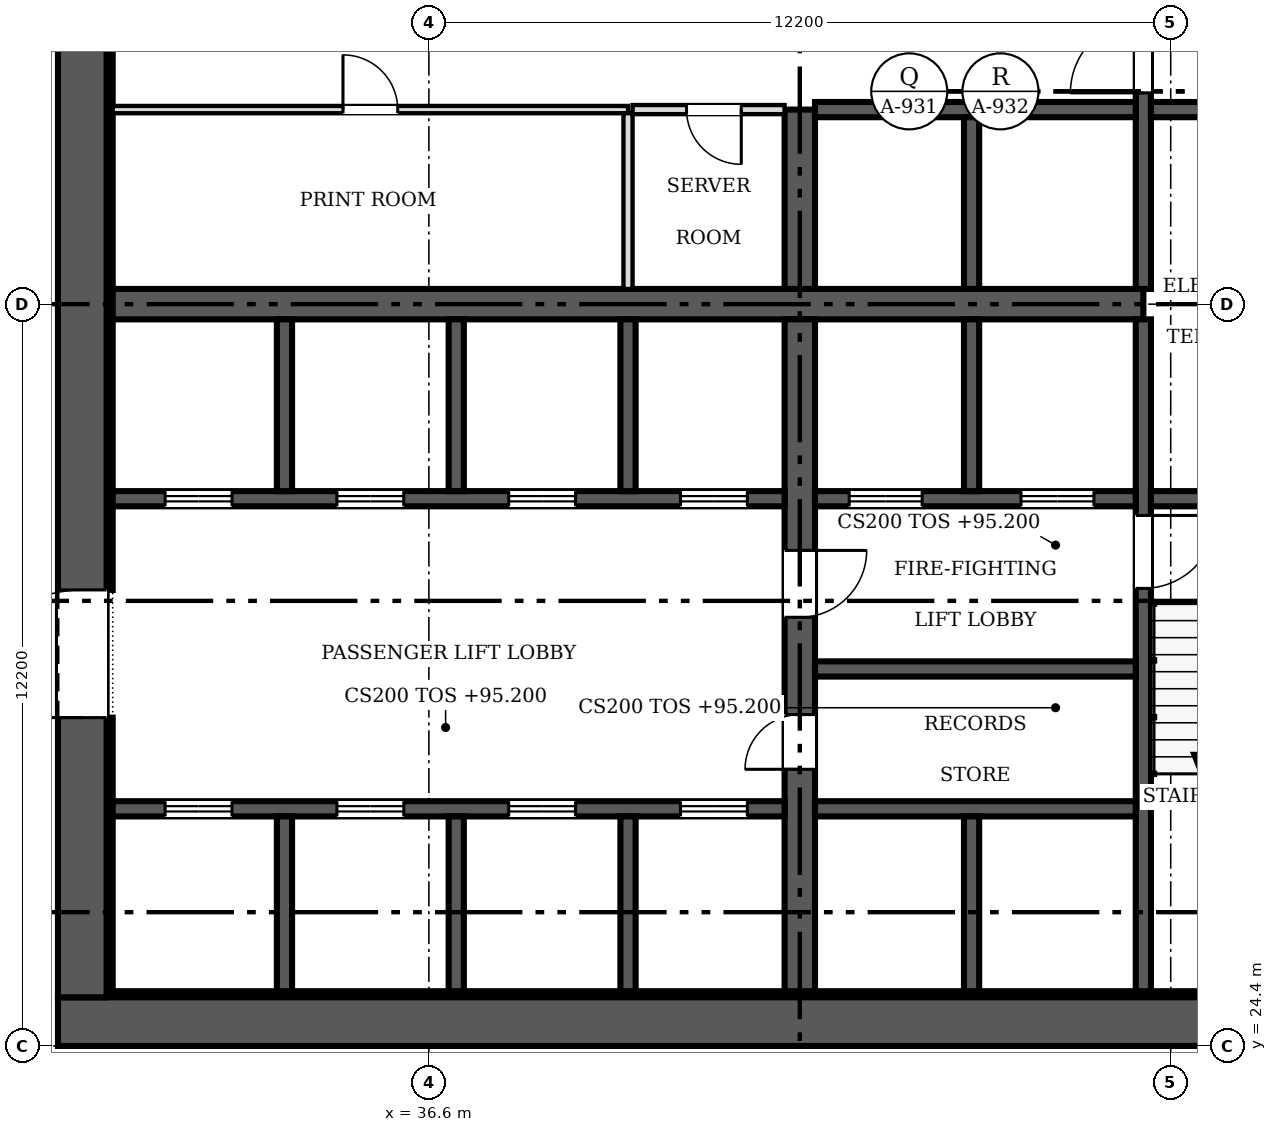
"""IFC4 building model, lengths in metres.
Left out: names, types, materials, properties, quantities, classifications, styles, units other than length and angle.
Written with IfcOpenShell. Run it as: python <this file> out.ifc"""

import sys

from ifc_helpers import new_model, si_unit, direction, frame, frame_2d, origin, place, context, subcontext, project, spatial, rectangle, extrude, source, transform, mapped, element, fill, save


model = new_model("IFC4")
c1 = context("Model", 3, precision=1e-05, world=origin(), true_north=direction((0.0, 1.0)))
c2 = subcontext(c1, "Body", "Model", "MODEL_VIEW")
j1 = project(units=[si_unit("LENGTHUNIT", "METRE"), si_unit("PLANEANGLEUNIT", "RADIAN")], contexts=[c1])
p1 = place(None, origin())
s1 = spatial("IfcSite", under=j1, at=p1, CompositionType="ELEMENT")
p2 = place(p1, origin())
s2 = spatial("IfcBuilding", under=s1, at=p2, CompositionType="ELEMENT")
p3 = place(p2, frame((0.0, 0.0, 95.2)))
s3 = spatial("IfcBuildingStorey", under=s2, at=p3, CompositionType="ELEMENT", Elevation=95.2)
p4 = place(p3, frame((54.9, 24.8, 0.0), z_axis=(0.0, 0.0, 1.0), x_axis=(-1.0, 0.0, 0.0)))
e1 = element("IfcWall", 1, at=p4, inside=s3, PredefinedType="SHEAR", context=c2, shape_type="SweptSolid", body=[
    extrude(rectangle(XDim=24.4, YDim=0.8, at=frame_2d((12.2, 0.0))), origin(), (0.0, 0.0, 1.0), 3.8),
])
m1 = source(origin(), c2, "Body", "SweptSolid", [
    extrude(rectangle(XDim=1.2, YDim=2.1, at=frame_2d((0.6, 1.05))), frame((0.0, 0.41, 0.0), z_axis=(0.0, -1.0, 0.0), x_axis=(1.0, 0.0, 0.0)), (0.0, 0.0, 1.0), 0.82),
])
p5 = place(p4, frame((1.5, 0.0, 0.0)))
e2 = element("IfcOpeningElement", 2, at=p5, cuts=e1, PredefinedType="OPENING", context=c2, shape_type="MappedRepresentation", body=[
    mapped(m1, transform((0.0, 0.0, 0.0), scale=1.0)),
])
p6 = place(p3, frame((30.9, 25.2, 0.0), z_axis=(0.0, 0.0, 1.0), x_axis=(0.0, 1.0, 0.0)))
e3 = element("IfcWall", 3, at=p6, inside=s3, PredefinedType="SHEAR", context=c2, shape_type="SweptSolid", body=[
    extrude(rectangle(XDim=22.8, YDim=0.8, at=frame_2d((11.4, 0.0))), origin(), (0.0, 0.0, 1.0), 3.8),
])
m2 = source(origin(), c2, "Body", "SweptSolid", [
    extrude(rectangle(XDim=2.1, YDim=2.4, at=frame_2d((1.05, 1.2))), frame((0.0, 0.41, 0.0), z_axis=(0.0, -1.0, 0.0), x_axis=(1.0, 0.0, 0.0)), (0.0, 0.0, 1.0), 0.82),
])
p7 = place(p6, frame((4.6, 0.0, 0.0)))
e4 = element("IfcOpeningElement", 4, at=p7, cuts=e3, PredefinedType="OPENING", context=c2, shape_type="MappedRepresentation", body=[
    mapped(m2, transform((0.0, 0.0, 0.0), scale=1.0)),
])
p8 = place(p6, frame((16.1, 0.0, 0.0)))
e5 = element("IfcOpeningElement", 5, at=p8, cuts=e3, PredefinedType="OPENING", context=c2, shape_type="MappedRepresentation", body=[
    mapped(m2, transform((0.0, 0.0, 0.0), scale=1.0)),
])
p9 = place(p3, frame((31.3, 25.25, 0.0), z_axis=(0.0, 0.0, 1.0), x_axis=(1.0, 0.0, 0.0)))
e6 = element("IfcWall", 6, at=p9, inside=s3, PredefinedType="SOLIDWALL", context=c2, shape_type="SweptSolid", body=[
    extrude(rectangle(XDim=20.9, YDim=0.1, at=frame_2d((10.45, 0.0))), origin(), (0.0, 0.0, 1.0), 3.8),
])
p10 = place(p3, frame((31.35, 25.3, 0.0), z_axis=(0.0, 0.0, 1.0), x_axis=(0.0, 1.0, 0.0)))
e7 = element("IfcWall", 7, at=p10, inside=s3, PredefinedType="SOLIDWALL", context=c2, shape_type="SweptSolid", body=[
    extrude(rectangle(XDim=4.5, YDim=0.1, at=frame_2d((2.25, 0.0))), origin(), (0.0, 0.0, 1.0), 3.8),
])
p11 = place(p3, frame((31.35, 31.9, 0.0), z_axis=(0.0, 0.0, 1.0), x_axis=(0.0, 1.0, 0.0)))
e8 = element("IfcWall", 8, at=p11, inside=s3, PredefinedType="SOLIDWALL", context=c2, shape_type="SweptSolid", body=[
    extrude(rectangle(XDim=9.4, YDim=0.1, at=frame_2d((4.7, 0.0))), origin(), (0.0, 0.0, 1.0), 3.8),
])
p12 = place(p3, frame((31.4, 36.6, 0.0), z_axis=(0.0, 0.0, 1.0), x_axis=(1.0, 0.0, 0.0)))
e9 = element("IfcWall", 9, at=p12, inside=s3, PredefinedType="SHEAR", context=c2, shape_type="SweptSolid", body=[
    extrude(rectangle(XDim=16.95, YDim=0.5, at=frame_2d((8.475, 0.0))), origin(), (0.0, 0.0, 1.0), 3.8),
])
p13 = place(p3, frame((42.7, 36.35, 0.0), z_axis=(0.0, 0.0, 1.0), x_axis=(0.0, -1.0, 0.0)))
e10 = element("IfcWall", 10, at=p13, inside=s3, PredefinedType="SHEAR", context=c2, shape_type="SweptSolid", body=[
    extrude(rectangle(XDim=11.05, YDim=0.5, at=frame_2d((5.525, 0.0))), origin(), (0.0, 0.0, 1.0), 3.8),
])
m3 = source(origin(), c2, "Body", "SweptSolid", [
    extrude(rectangle(XDim=0.9, YDim=2.1, at=frame_2d((0.45, 1.05))), frame((0.0, 0.26, 0.0), z_axis=(0.0, -1.0, 0.0), x_axis=(1.0, 0.0, 0.0)), (0.0, 0.0, 1.0), 0.52),
])
p14 = place(p13, frame((6.5, 0.0, 0.0)))
e11 = element("IfcOpeningElement", 11, at=p14, cuts=e10, PredefinedType="OPENING", context=c2, shape_type="MappedRepresentation", body=[
    mapped(m3, transform((0.0, 0.0, 0.0), scale=1.0)),
])
m4 = source(origin(), c2, "Body", "SweptSolid", [
    extrude(rectangle(XDim=1.1, YDim=2.1, at=frame_2d((0.55, 1.05))), frame((0.0, 0.26, 0.0), z_axis=(0.0, -1.0, 0.0), x_axis=(1.0, 0.0, 0.0)), (0.0, 0.0, 1.0), 0.52),
])
p15 = place(p13, frame((3.8, 0.0, 0.0)))
e12 = element("IfcOpeningElement", 12, at=p15, cuts=e10, PredefinedType="OPENING", context=c2, shape_type="MappedRepresentation", body=[
    mapped(m4, transform((0.0, 0.0, 0.0), scale=1.0)),
])
p16 = place(p3, frame((42.7, 36.85, 0.0), z_axis=(0.0, 0.0, 1.0), x_axis=(0.0, 1.0, 0.0)))
e13 = element("IfcWall", 13, at=p16, inside=s3, PredefinedType="SHEAR", context=c2, shape_type="SweptSolid", body=[
    extrude(rectangle(XDim=2.95, YDim=0.5, at=frame_2d((1.475, 0.0))), origin(), (0.0, 0.0, 1.0), 3.8),
])
p17 = place(p3, frame((48.35, 36.35, 0.0), z_axis=(0.0, 0.0, 1.0), x_axis=(0.0, -1.0, 0.0)))
e14 = element("IfcWall", 14, at=p17, inside=s3, PredefinedType="SOLIDWALL", context=c2, shape_type="SweptSolid", body=[
    extrude(rectangle(XDim=11.05, YDim=0.25, at=frame_2d((5.525, 0.0))), origin(), (0.0, 0.0, 1.0), 3.8),
])
m5 = source(origin(), c2, "Body", "SweptSolid", [
    extrude(rectangle(XDim=1.2, YDim=2.1, at=frame_2d((0.6, 1.05))), frame((0.0, 0.135, 0.0), z_axis=(0.0, -1.0, 0.0), x_axis=(1.0, 0.0, 0.0)), (0.0, 0.0, 1.0), 0.27),
])
p18 = place(p17, frame((3.225, 0.0, 0.0)))
e15 = element("IfcOpeningElement", 15, at=p18, cuts=e14, PredefinedType="OPENING", context=c2, shape_type="MappedRepresentation", body=[
    mapped(m5, transform((0.0, 0.0, 0.0), scale=1.0)),
])
p19 = place(p3, frame((48.35, 47.9, 0.0), z_axis=(0.0, 0.0, 1.0), x_axis=(0.0, -1.0, 0.0)))
e16 = element("IfcWall", 16, at=p19, inside=s3, PredefinedType="SOLIDWALL", context=c2, shape_type="SweptSolid", body=[
    extrude(rectangle(XDim=11.05, YDim=0.25, at=frame_2d((5.525, 0.0))), origin(), (0.0, 0.0, 1.0), 3.8),
])
p20 = place(p19, frame((6.625, 0.0, 0.0)))
e17 = element("IfcOpeningElement", 17, at=p20, cuts=e16, PredefinedType="OPENING", context=c2, shape_type="MappedRepresentation", body=[
    mapped(m5, transform((0.0, 0.0, 0.0), scale=1.0)),
])
p21 = place(p3, frame((42.45, 33.4, 0.0), z_axis=(0.0, 0.0, 1.0), x_axis=(-1.0, 0.0, 0.0)))
e18 = element("IfcWall", 18, at=p21, inside=s3, PredefinedType="SOLIDWALL", context=c2, shape_type="SweptSolid", body=[
    extrude(rectangle(XDim=11.05, YDim=0.25, at=frame_2d((5.525, 0.0))), origin(), (0.0, 0.0, 1.0), 3.8),
])
m6 = source(origin(), c2, "Body", "SweptSolid", [
    extrude(rectangle(XDim=1.1, YDim=2.1, at=frame_2d((0.55, 1.05))), frame((0.0, 0.135, 0.0), z_axis=(0.0, -1.0, 0.0), x_axis=(1.0, 0.0, 0.0)), (0.0, 0.0, 1.0), 0.27),
])
p22 = place(p21, frame((9.087, 0.0, 0.0)))
e19 = element("IfcOpeningElement", 19, at=p22, cuts=e18, PredefinedType="OPENING", context=c2, shape_type="MappedRepresentation", body=[
    mapped(m6, transform((0.0, 0.0, 0.0), scale=1.0)),
])
p23 = place(p21, frame((6.262, 0.0, 0.0)))
e20 = element("IfcOpeningElement", 20, at=p23, cuts=e18, PredefinedType="OPENING", context=c2, shape_type="MappedRepresentation", body=[
    mapped(m6, transform((0.0, 0.0, 0.0), scale=1.0)),
])
p24 = place(p21, frame((3.438, 0.0, 0.0)))
e21 = element("IfcOpeningElement", 21, at=p24, cuts=e18, PredefinedType="OPENING", context=c2, shape_type="MappedRepresentation", body=[
    mapped(m6, transform((0.0, 0.0, 0.0), scale=1.0)),
])
p25 = place(p21, frame((0.613, 0.0, 0.0)))
e22 = element("IfcOpeningElement", 22, at=p25, cuts=e18, PredefinedType="OPENING", context=c2, shape_type="MappedRepresentation", body=[
    mapped(m6, transform((0.0, 0.0, 0.0), scale=1.0)),
])
p26 = place(p3, frame((48.225, 33.4, 0.0), z_axis=(0.0, 0.0, 1.0), x_axis=(-1.0, 0.0, 0.0)))
e23 = element("IfcWall", 23, at=p26, inside=s3, PredefinedType="SOLIDWALL", context=c2, shape_type="SweptSolid", body=[
    extrude(rectangle(XDim=5.275, YDim=0.25, at=frame_2d((2.638, 0.0))), origin(), (0.0, 0.0, 1.0), 3.8),
])
p27 = place(p26, frame((3.512, 0.0, 0.0)))
e24 = element("IfcOpeningElement", 24, at=p27, cuts=e23, PredefinedType="OPENING", context=c2, shape_type="MappedRepresentation", body=[
    mapped(m5, transform((0.0, 0.0, 0.0), scale=1.0)),
])
p28 = place(p26, frame((0.688, 0.0, 0.0)))
e25 = element("IfcOpeningElement", 25, at=p28, cuts=e23, PredefinedType="OPENING", context=c2, shape_type="MappedRepresentation", body=[
    mapped(m5, transform((0.0, 0.0, 0.0), scale=1.0)),
])
p29 = place(p3, frame((48.475, 33.4, 0.0), z_axis=(0.0, 0.0, 1.0), x_axis=(1.0, 0.0, 0.0)))
e26 = element("IfcWall", 26, at=p29, inside=s3, PredefinedType="SOLIDWALL", context=c2, shape_type="SweptSolid", body=[
    extrude(rectangle(XDim=3.525, YDim=0.25, at=frame_2d((1.762, 0.0))), origin(), (0.0, 0.0, 1.0), 3.8),
])
p30 = place(p3, frame((31.4, 28.3, 0.0), z_axis=(0.0, 0.0, 1.0), x_axis=(1.0, 0.0, 0.0)))
e27 = element("IfcWall", 27, at=p30, inside=s3, PredefinedType="SOLIDWALL", context=c2, shape_type="SweptSolid", body=[
    extrude(rectangle(XDim=11.05, YDim=0.25, at=frame_2d((5.525, 0.0))), origin(), (0.0, 0.0, 1.0), 3.8),
])
p31 = place(p30, frame((0.863, 0.0, 0.0)))
e28 = element("IfcOpeningElement", 28, at=p31, cuts=e27, PredefinedType="OPENING", context=c2, shape_type="MappedRepresentation", body=[
    mapped(m6, transform((0.0, 0.0, 0.0), scale=1.0)),
])
p32 = place(p30, frame((3.688, 0.0, 0.0)))
e29 = element("IfcOpeningElement", 29, at=p32, cuts=e27, PredefinedType="OPENING", context=c2, shape_type="MappedRepresentation", body=[
    mapped(m6, transform((0.0, 0.0, 0.0), scale=1.0)),
])
p33 = place(p30, frame((6.512, 0.0, 0.0)))
e30 = element("IfcOpeningElement", 30, at=p33, cuts=e27, PredefinedType="OPENING", context=c2, shape_type="MappedRepresentation", body=[
    mapped(m6, transform((0.0, 0.0, 0.0), scale=1.0)),
])
p34 = place(p30, frame((9.337, 0.0, 0.0)))
e31 = element("IfcOpeningElement", 31, at=p34, cuts=e27, PredefinedType="OPENING", context=c2, shape_type="MappedRepresentation", body=[
    mapped(m6, transform((0.0, 0.0, 0.0), scale=1.0)),
])
for number, where, z_axis, x_axis in (
    (32, (42.95, 28.3, 0.0), (0.0, 0.0, 1.0), (1.0, 0.0, 0.0)),
    (33, (42.95, 39.8, 0.0), (0.0, 0.0, 1.0), (1.0, 0.0, 0.0)),
):
    element("IfcWall", number, at=place(p3, frame(where, z_axis=z_axis, x_axis=x_axis)), inside=s3, PredefinedType="SOLIDWALL", context=c2, shape_type="SweptSolid", body=[
        extrude(rectangle(XDim=5.275, YDim=0.25, at=frame_2d((2.638, 0.0))), origin(), (0.0, 0.0, 1.0), 3.8),
    ])
p35 = place(p3, frame((48.475, 39.8, 0.0), z_axis=(0.0, 0.0, 1.0), x_axis=(1.0, 0.0, 0.0)))
e34 = element("IfcWall", 34, at=p35, inside=s3, PredefinedType="SOLIDWALL", context=c2, shape_type="SweptSolid", body=[
    extrude(rectangle(XDim=3.525, YDim=0.25, at=frame_2d((1.762, 0.0))), origin(), (0.0, 0.0, 1.0), 3.8),
])
p36 = place(p3, frame((45.525, 33.525, 0.0), z_axis=(0.0, 0.0, 1.0), x_axis=(0.0, 1.0, 0.0)))
e35 = element("IfcWall", 35, at=p36, inside=s3, PredefinedType="SOLIDWALL", context=c2, shape_type="SweptSolid", body=[
    extrude(rectangle(XDim=2.825, YDim=0.25, at=frame_2d((1.413, 0.0))), origin(), (0.0, 0.0, 1.0), 3.8),
])
p37 = place(p3, frame((45.525, 36.85, 0.0), z_axis=(0.0, 0.0, 1.0), x_axis=(0.0, 1.0, 0.0)))
e36 = element("IfcWall", 36, at=p37, inside=s3, PredefinedType="SOLIDWALL", context=c2, shape_type="SweptSolid", body=[
    extrude(rectangle(XDim=2.825, YDim=0.25, at=frame_2d((1.413, 0.0))), origin(), (0.0, 0.0, 1.0), 3.8),
])
p38 = place(p3, frame((42.95, 30.6, 0.0), z_axis=(0.0, 0.0, 1.0), x_axis=(1.0, 0.0, 0.0)))
e37 = element("IfcWall", 37, at=p38, inside=s3, PredefinedType="SOLIDWALL", context=c2, shape_type="SweptSolid", body=[
    extrude(rectangle(XDim=5.275, YDim=0.25, at=frame_2d((2.638, 0.0))), origin(), (0.0, 0.0, 1.0), 3.8),
])
for number, where, z_axis, x_axis in (
    (38, (34.225, 33.525, 0.0), (0.0, 0.0, 1.0), (0.0, 1.0, 0.0)),
    (39, (37.05, 33.525, 0.0), (0.0, 0.0, 1.0), (0.0, 1.0, 0.0)),
    (40, (39.875, 33.525, 0.0), (0.0, 0.0, 1.0), (0.0, 1.0, 0.0)),
):
    element("IfcWall", number, at=place(p3, frame(where, z_axis=z_axis, x_axis=x_axis)), inside=s3, PredefinedType="SOLIDWALL", context=c2, shape_type="SweptSolid", body=[
        extrude(rectangle(XDim=2.825, YDim=0.25, at=frame_2d((1.413, 0.0))), origin(), (0.0, 0.0, 1.0), 3.8),
    ])
for number, where, z_axis, x_axis in (
    (41, (34.225, 25.3, 0.0), (0.0, 0.0, 1.0), (0.0, 1.0, 0.0)),
    (42, (37.05, 25.3, 0.0), (0.0, 0.0, 1.0), (0.0, 1.0, 0.0)),
    (43, (39.875, 25.3, 0.0), (0.0, 0.0, 1.0), (0.0, 1.0, 0.0)),
    (44, (45.525, 25.3, 0.0), (0.0, 0.0, 1.0), (0.0, 1.0, 0.0)),
):
    element("IfcWall", number, at=place(p3, frame(where, z_axis=z_axis, x_axis=x_axis)), inside=s3, PredefinedType="SOLIDWALL", context=c2, shape_type="SweptSolid", body=[
        extrude(rectangle(XDim=2.875, YDim=0.25, at=frame_2d((1.438, 0.0))), origin(), (0.0, 0.0, 1.0), 3.8),
    ])
p39 = place(p3, frame((39.875, 39.8, 0.0), z_axis=(0.0, 0.0, 1.0), x_axis=(-1.0, 0.0, 0.0)))
e45 = element("IfcWall", 45, at=p39, inside=s3, PredefinedType="PARTITIONING", context=c2, shape_type="SweptSolid", body=[
    extrude(rectangle(XDim=8.475, YDim=0.12, at=frame_2d((4.238, 0.0))), origin(), (0.0, 0.0, 1.0), 3.6),
])
m7 = source(origin(), c2, "Body", "SweptSolid", [
    extrude(rectangle(XDim=0.9, YDim=2.1, at=frame_2d((0.45, 1.05))), frame((0.0, 0.07, 0.0), z_axis=(0.0, -1.0, 0.0), x_axis=(1.0, 0.0, 0.0)), (0.0, 0.0, 1.0), 0.14),
])
p40 = place(p39, frame((3.788, 0.0, 0.0)))
e46 = element("IfcOpeningElement", 46, at=p40, cuts=e45, PredefinedType="OPENING", context=c2, shape_type="MappedRepresentation", body=[
    mapped(m7, transform((0.0, 0.0, 0.0), scale=1.0)),
])
p41 = place(p3, frame((39.875, 36.85, 0.0), z_axis=(0.0, 0.0, 1.0), x_axis=(0.0, 1.0, 0.0)))
e47 = element("IfcWall", 47, at=p41, inside=s3, PredefinedType="PARTITIONING", context=c2, shape_type="SweptSolid", body=[
    extrude(rectangle(XDim=2.89, YDim=0.15, at=frame_2d((1.445, 0.0))), origin(), (0.0, 0.0, 1.0), 3.6),
])
p42 = place(p3, frame((42.45, 39.8, 0.0), z_axis=(0.0, 0.0, 1.0), x_axis=(-1.0, 0.0, 0.0)))
e48 = element("IfcWall", 48, at=p42, inside=s3, PredefinedType="PARTITIONING", context=c2, shape_type="SweptSolid", body=[
    extrude(rectangle(XDim=2.5, YDim=0.15, at=frame_2d((1.25, 0.0))), origin(), (0.0, 0.0, 1.0), 3.6),
])
m8 = source(origin(), c2, "Body", "SweptSolid", [
    extrude(rectangle(XDim=0.9, YDim=2.1, at=frame_2d((0.45, 1.05))), frame((0.0, 0.085, 0.0), z_axis=(0.0, -1.0, 0.0), x_axis=(1.0, 0.0, 0.0)), (0.0, 0.0, 1.0), 0.17),
])
p43 = place(p42, frame((0.712, 0.0, 0.0)))
e49 = element("IfcOpeningElement", 49, at=p43, cuts=e48, PredefinedType="OPENING", context=c2, shape_type="MappedRepresentation", body=[
    mapped(m8, transform((0.0, 0.0, 0.0), scale=1.0)),
])
m9 = source(origin(), c2, "Body", "SweptSolid", [
    extrude(rectangle(XDim=2.1, YDim=2.4, at=frame_2d((1.05, 1.2))), frame((0.0, 0.025, 0.0), z_axis=(0.0, -1.0, 0.0), x_axis=(1.0, 0.0, 0.0)), (0.0, 0.0, 1.0), 0.05),
])
p44 = place(p7, origin())
e50 = element("IfcDoor", 50, at=p44, inside=s3, OperationType="DOUBLE_DOOR_SINGLE_SWING", PredefinedType="DOOR", context=c2, shape_type="MappedRepresentation", body=[
    mapped(m9, transform((0.0, 0.0, 0.0), scale=1.0)),
])
fill(e4, e50)
m10 = source(origin(), c2, "Body", "SweptSolid", [
    extrude(rectangle(XDim=0.9, YDim=2.1, at=frame_2d((0.45, 1.05))), frame((0.0, 0.025, 0.0), z_axis=(0.0, -1.0, 0.0), x_axis=(1.0, 0.0, 0.0)), (0.0, 0.0, 1.0), 0.05),
])
p45 = place(p14, origin())
e51 = element("IfcDoor", 51, at=p45, inside=s3, OperationType="SINGLE_SWING_RIGHT", PredefinedType="DOOR", context=c2, shape_type="MappedRepresentation", body=[
    mapped(m10, transform((0.0, 0.0, 0.0), scale=1.0)),
])
fill(e11, e51)
m11 = source(origin(), c2, "Body", "SweptSolid", [
    extrude(rectangle(XDim=1.1, YDim=2.1, at=frame_2d((0.55, 1.05))), frame((0.0, 0.025, 0.0), z_axis=(0.0, -1.0, 0.0), x_axis=(1.0, 0.0, 0.0)), (0.0, 0.0, 1.0), 0.05),
])
p46 = place(p15, origin())
e52 = element("IfcDoor", 52, at=p46, inside=s3, OperationType="SINGLE_SWING_LEFT", PredefinedType="DOOR", context=c2, shape_type="MappedRepresentation", body=[
    mapped(m11, transform((0.0, 0.0, 0.0), scale=1.0)),
])
fill(e12, e52)
m12 = source(origin(), c2, "Body", "SweptSolid", [
    extrude(rectangle(XDim=1.2, YDim=2.1, at=frame_2d((0.6, 1.05))), frame((0.0, 0.025, 0.0), z_axis=(0.0, -1.0, 0.0), x_axis=(1.0, 0.0, 0.0)), (0.0, 0.0, 1.0), 0.05),
])
p47 = place(p18, origin())
e53 = element("IfcDoor", 53, at=p47, inside=s3, OperationType="SINGLE_SWING_LEFT", PredefinedType="DOOR", context=c2, shape_type="MappedRepresentation", body=[
    mapped(m12, transform((0.0, 0.0, 0.0), scale=1.0)),
])
fill(e15, e53)
p48 = place(p20, origin())
e54 = element("IfcDoor", 54, at=p48, inside=s3, OperationType="SINGLE_SWING_RIGHT", PredefinedType="DOOR", context=c2, shape_type="MappedRepresentation", body=[
    mapped(m12, transform((0.0, 0.0, 0.0), scale=1.0)),
])
fill(e17, e54)
p49 = place(p22, origin())
e55 = element("IfcDoor", 55, at=p49, inside=s3, OperationType="DOUBLE_DOOR_SLIDING", PredefinedType="DOOR", context=c2, shape_type="MappedRepresentation", body=[
    mapped(m11, transform((0.0, 0.0, 0.0), scale=1.0)),
])
fill(e19, e55)
p50 = place(p23, origin())
e56 = element("IfcDoor", 56, at=p50, inside=s3, OperationType="DOUBLE_DOOR_SLIDING", PredefinedType="DOOR", context=c2, shape_type="MappedRepresentation", body=[
    mapped(m11, transform((0.0, 0.0, 0.0), scale=1.0)),
])
fill(e20, e56)
p51 = place(p24, origin())
e57 = element("IfcDoor", 57, at=p51, inside=s3, OperationType="DOUBLE_DOOR_SLIDING", PredefinedType="DOOR", context=c2, shape_type="MappedRepresentation", body=[
    mapped(m11, transform((0.0, 0.0, 0.0), scale=1.0)),
])
fill(e21, e57)
p52 = place(p25, origin())
e58 = element("IfcDoor", 58, at=p52, inside=s3, OperationType="DOUBLE_DOOR_SLIDING", PredefinedType="DOOR", context=c2, shape_type="MappedRepresentation", body=[
    mapped(m11, transform((0.0, 0.0, 0.0), scale=1.0)),
])
fill(e22, e58)
p53 = place(p27, origin())
e59 = element("IfcDoor", 59, at=p53, inside=s3, OperationType="DOUBLE_DOOR_SLIDING", PredefinedType="DOOR", context=c2, shape_type="MappedRepresentation", body=[
    mapped(m12, transform((0.0, 0.0, 0.0), scale=1.0)),
])
fill(e24, e59)
p54 = place(p28, origin())
e60 = element("IfcDoor", 60, at=p54, inside=s3, OperationType="DOUBLE_DOOR_SLIDING", PredefinedType="DOOR", context=c2, shape_type="MappedRepresentation", body=[
    mapped(m12, transform((0.0, 0.0, 0.0), scale=1.0)),
])
fill(e25, e60)
p55 = place(p31, origin())
e61 = element("IfcDoor", 61, at=p55, inside=s3, OperationType="DOUBLE_DOOR_SLIDING", PredefinedType="DOOR", context=c2, shape_type="MappedRepresentation", body=[
    mapped(m11, transform((0.0, 0.0, 0.0), scale=1.0)),
])
fill(e28, e61)
p56 = place(p32, origin())
e62 = element("IfcDoor", 62, at=p56, inside=s3, OperationType="DOUBLE_DOOR_SLIDING", PredefinedType="DOOR", context=c2, shape_type="MappedRepresentation", body=[
    mapped(m11, transform((0.0, 0.0, 0.0), scale=1.0)),
])
fill(e29, e62)
p57 = place(p33, origin())
e63 = element("IfcDoor", 63, at=p57, inside=s3, OperationType="DOUBLE_DOOR_SLIDING", PredefinedType="DOOR", context=c2, shape_type="MappedRepresentation", body=[
    mapped(m11, transform((0.0, 0.0, 0.0), scale=1.0)),
])
fill(e30, e63)
p58 = place(p34, origin())
e64 = element("IfcDoor", 64, at=p58, inside=s3, OperationType="DOUBLE_DOOR_SLIDING", PredefinedType="DOOR", context=c2, shape_type="MappedRepresentation", body=[
    mapped(m11, transform((0.0, 0.0, 0.0), scale=1.0)),
])
fill(e31, e64)
p59 = place(p40, origin())
e65 = element("IfcDoor", 65, at=p59, inside=s3, OperationType="SINGLE_SWING_RIGHT", PredefinedType="DOOR", context=c2, shape_type="MappedRepresentation", body=[
    mapped(m10, transform((0.0, 0.0, 0.0), scale=1.0)),
])
fill(e46, e65)
p60 = place(p43, origin())
e66 = element("IfcDoor", 66, at=p60, inside=s3, OperationType="SINGLE_SWING_LEFT", PredefinedType="DOOR", context=c2, shape_type="MappedRepresentation", body=[
    mapped(m10, transform((0.0, 0.0, 0.0), scale=1.0)),
])
fill(e49, e66)
save(model, sys.argv[1])
